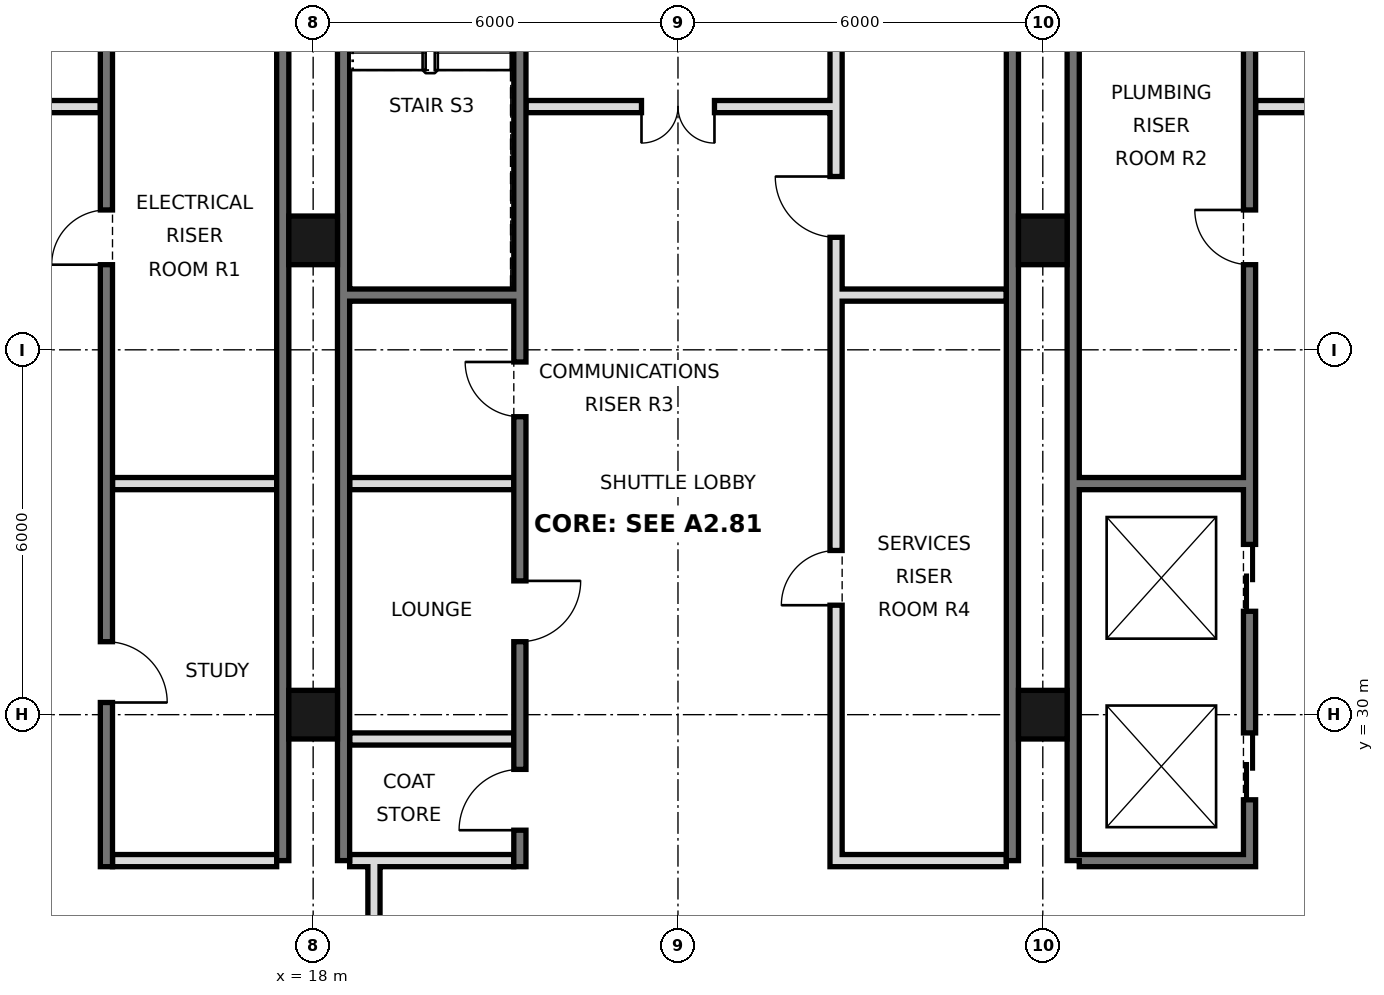
"""IFC4 building model, lengths in metres.
Left out: names, types, materials, properties, quantities, classifications, styles, units other than length and angle.
Written with IfcOpenShell. Run it as: python <this file> out.ifc"""

import sys

from ifc_helpers import new_model, si_unit, direction, frame, frame_2d, origin, origin_2d, place, context, subcontext, project, spatial, rectangle, hollow_rectangle, extrude, element, fill, save


model = new_model("IFC4")
c1 = context("Model", 3, precision=1e-05, world=origin(), true_north=direction((0.0, 1.0)))
c2 = subcontext(c1, "Body", "Model", "MODEL_VIEW")
j1 = project(units=[si_unit("LENGTHUNIT", "METRE"), si_unit("PLANEANGLEUNIT", "RADIAN")], contexts=[c1])
p1 = place(None, origin())
s1 = spatial("IfcSite", under=j1, at=p1, CompositionType="ELEMENT")
p2 = place(p1, origin())
s2 = spatial("IfcBuilding", under=s1, at=p2, CompositionType="ELEMENT")
p3 = place(p2, frame((0.0, 0.0, 323.2)))
s3 = spatial("IfcBuildingStorey", under=s2, at=p3, CompositionType="ELEMENT", Elevation=323.2)
for number, where, z_axis, x_axis in (
    (1, (18.0, 30.0, 0.0), (0.0, 0.0, 1.0), (1.0, 0.0, 0.0)),
    (2, (18.0, 37.8, 0.0), (0.0, 0.0, 1.0), (1.0, 0.0, 0.0)),
    (3, (30.0, 30.0, 0.0), (0.0, 0.0, 1.0), (1.0, 0.0, 0.0)),
    (4, (30.0, 37.8, 0.0), (0.0, 0.0, 1.0), (1.0, 0.0, 0.0)),
):
    element("IfcColumn", number, at=place(p3, frame(where, z_axis=z_axis, x_axis=x_axis)), inside=s3, PredefinedType="COLUMN", context=c2, shape_type="SweptSolid", body=[
        extrude(hollow_rectangle(XDim=0.8, YDim=0.8, WallThickness=0.025, at=origin_2d()), origin(), (0.0, 0.0, 1.0), 3.6),
    ])
for number, where, z_axis, x_axis in (
    (5, (17.5, 27.6, 0.0), (0.0, 0.0, 1.0), (0.0, 1.0, 0.0)),
    (6, (18.5, 27.6, 0.0), (0.0, 0.0, 1.0), (0.0, 1.0, 0.0)),
    (7, (29.5, 27.6, 0.0), (0.0, 0.0, 1.0), (0.0, 1.0, 0.0)),
    (8, (30.5, 27.6, 0.0), (0.0, 0.0, 1.0), (0.0, 1.0, 0.0)),
):
    element("IfcWall", number, at=place(p3, frame(where, z_axis=z_axis, x_axis=x_axis)), inside=s3, PredefinedType="SOLIDWALL", context=c2, shape_type="SweptSolid", body=[
        extrude(rectangle(XDim=17.5, YDim=0.2, at=frame_2d((8.75, 0.0))), origin(), (0.0, 0.0, 1.0), 3.42),
    ])
p4 = place(p3, frame((19.0, 21.6, 0.0), z_axis=(0.0, 0.0, 1.0), x_axis=(0.0, 1.0, 0.0)))
e9 = element("IfcWall", 9, at=p4, inside=s3, PredefinedType="PARTITIONING", context=c2, shape_type="SweptSolid", body=[
    extrude(rectangle(XDim=6.0, YDim=0.2, at=frame_2d((3.0, 0.0))), origin(), (0.0, 0.0, 1.0), 3.42),
])
p5 = place(p4, frame((2.1, 0.0, 0.0)))
e10 = element("IfcOpeningElement", 10, at=p5, cuts=e9, PredefinedType="OPENING", context=c2, shape_type="SweptSolid", body=[
    extrude(rectangle(XDim=1.8, YDim=2.1, at=frame_2d((0.9, 1.05))), frame((0.0, 0.11, 0.0), z_axis=(0.0, -1.0, 0.0), x_axis=(1.0, 0.0, 0.0)), (0.0, 0.0, 1.0), 0.22),
])
p6 = place(p3, frame((14.6, 27.5, 0.0), z_axis=(0.0, 0.0, 1.0), x_axis=(0.0, 1.0, 0.0)))
e11 = element("IfcWall", 11, at=p6, inside=s3, PredefinedType="SOLIDWALL", context=c2, shape_type="SweptSolid", body=[
    extrude(rectangle(XDim=17.5, YDim=0.2, at=frame_2d((8.75, 0.0))), origin(), (0.0, 0.0, 1.0), 3.42),
])
p7 = place(p6, frame((15.4, 0.0, 0.0)))
e12 = element("IfcOpeningElement", 12, at=p7, cuts=e11, PredefinedType="OPENING", context=c2, shape_type="SweptSolid", body=[
    extrude(rectangle(XDim=1.1, YDim=2.1, at=frame_2d((0.55, 1.05))), frame((0.0, 0.11, 0.0), z_axis=(0.0, -1.0, 0.0), x_axis=(1.0, 0.0, 0.0)), (0.0, 0.0, 1.0), 0.22),
])
p8 = place(p6, frame((2.7, 0.0, 0.0)))
e13 = element("IfcOpeningElement", 13, at=p8, cuts=e11, PredefinedType="OPENING", context=c2, shape_type="SweptSolid", body=[
    extrude(rectangle(XDim=1.0, YDim=2.1, at=frame_2d((0.5, 1.05))), frame((0.0, 0.11, 0.0), z_axis=(0.0, -1.0, 0.0), x_axis=(1.0, 0.0, 0.0)), (0.0, 0.0, 1.0), 0.22),
])
p9 = place(p6, frame((9.9, 0.0, 0.0)))
e14 = element("IfcOpeningElement", 14, at=p9, cuts=e11, PredefinedType="OPENING", context=c2, shape_type="SweptSolid", body=[
    extrude(rectangle(XDim=0.9, YDim=2.1, at=frame_2d((0.45, 1.05))), frame((0.0, 0.11, 0.0), z_axis=(0.0, -1.0, 0.0), x_axis=(1.0, 0.0, 0.0)), (0.0, 0.0, 1.0), 0.22),
])
p10 = place(p3, frame((21.4, 27.5, 0.0), z_axis=(0.0, 0.0, 1.0), x_axis=(0.0, 1.0, 0.0)))
e15 = element("IfcWall", 15, at=p10, inside=s3, PredefinedType="SOLIDWALL", context=c2, shape_type="SweptSolid", body=[
    extrude(rectangle(XDim=17.5, YDim=0.2, at=frame_2d((8.75, 0.0))), origin(), (0.0, 0.0, 1.0), 3.42),
])
p11 = place(p10, frame((0.6, 0.0, 0.0)))
e16 = element("IfcOpeningElement", 16, at=p11, cuts=e15, PredefinedType="OPENING", context=c2, shape_type="SweptSolid", body=[
    extrude(rectangle(XDim=1.0, YDim=2.1, at=frame_2d((0.5, 1.05))), frame((0.0, 0.11, 0.0), z_axis=(0.0, -1.0, 0.0), x_axis=(1.0, 0.0, 0.0)), (0.0, 0.0, 1.0), 0.22),
])
p12 = place(p10, frame((3.7, 0.0, 0.0)))
e17 = element("IfcOpeningElement", 17, at=p12, cuts=e15, PredefinedType="OPENING", context=c2, shape_type="SweptSolid", body=[
    extrude(rectangle(XDim=1.0, YDim=2.1, at=frame_2d((0.5, 1.05))), frame((0.0, 0.11, 0.0), z_axis=(0.0, -1.0, 0.0), x_axis=(1.0, 0.0, 0.0)), (0.0, 0.0, 1.0), 0.22),
])
p13 = place(p10, frame((16.2, 0.0, 0.0)))
e18 = element("IfcOpeningElement", 18, at=p13, cuts=e15, PredefinedType="OPENING", context=c2, shape_type="SweptSolid", body=[
    extrude(rectangle(XDim=1.0, YDim=2.1, at=frame_2d((0.5, 1.05))), frame((0.0, 0.11, 0.0), z_axis=(0.0, -1.0, 0.0), x_axis=(1.0, 0.0, 0.0)), (0.0, 0.0, 1.0), 0.22),
])
p14 = place(p10, frame((7.4, 0.0, 0.0)))
e19 = element("IfcOpeningElement", 19, at=p14, cuts=e15, PredefinedType="OPENING", context=c2, shape_type="SweptSolid", body=[
    extrude(rectangle(XDim=0.9, YDim=2.1, at=frame_2d((0.45, 1.05))), frame((0.0, 0.11, 0.0), z_axis=(0.0, -1.0, 0.0), x_axis=(1.0, 0.0, 0.0)), (0.0, 0.0, 1.0), 0.22),
])
p15 = place(p3, frame((26.6, 27.5, 0.0), z_axis=(0.0, 0.0, 1.0), x_axis=(0.0, 1.0, 0.0)))
e20 = element("IfcWall", 20, at=p15, inside=s3, PredefinedType="SOLIDWALL", context=c2, shape_type="SweptSolid", body=[
    extrude(rectangle(XDim=17.5, YDim=0.2, at=frame_2d((8.75, 0.0))), origin(), (0.0, 0.0, 1.0), 3.42),
])
p16 = place(p15, frame((4.3, 0.0, 0.0)))
e21 = element("IfcOpeningElement", 21, at=p16, cuts=e20, PredefinedType="OPENING", context=c2, shape_type="SweptSolid", body=[
    extrude(rectangle(XDim=0.9, YDim=2.1, at=frame_2d((0.45, 1.05))), frame((0.0, 0.11, 0.0), z_axis=(0.0, -1.0, 0.0), x_axis=(1.0, 0.0, 0.0)), (0.0, 0.0, 1.0), 0.22),
])
p17 = place(p15, frame((10.35, 0.0, 0.0)))
e22 = element("IfcOpeningElement", 22, at=p17, cuts=e20, PredefinedType="OPENING", context=c2, shape_type="SweptSolid", body=[
    extrude(rectangle(XDim=1.0, YDim=2.1, at=frame_2d((0.5, 1.05))), frame((0.0, 0.11, 0.0), z_axis=(0.0, -1.0, 0.0), x_axis=(1.0, 0.0, 0.0)), (0.0, 0.0, 1.0), 0.22),
])
p18 = place(p3, frame((33.4, 27.5, 0.0), z_axis=(0.0, 0.0, 1.0), x_axis=(0.0, 1.0, 0.0)))
e23 = element("IfcWall", 23, at=p18, inside=s3, PredefinedType="SOLIDWALL", context=c2, shape_type="SweptSolid", body=[
    extrude(rectangle(XDim=17.5, YDim=0.2, at=frame_2d((8.75, 0.0))), origin(), (0.0, 0.0, 1.0), 3.42),
])
p19 = place(p18, frame((1.1, 0.0, 0.0)))
e24 = element("IfcOpeningElement", 24, at=p19, cuts=e23, PredefinedType="OPENING", context=c2, shape_type="SweptSolid", body=[
    extrude(rectangle(XDim=1.1, YDim=2.1, at=frame_2d((0.55, 1.05))), frame((0.0, 0.11, 0.0), z_axis=(0.0, -1.0, 0.0), x_axis=(1.0, 0.0, 0.0)), (0.0, 0.0, 1.0), 0.22),
])
p20 = place(p18, frame((4.2, 0.0, 0.0)))
e25 = element("IfcOpeningElement", 25, at=p20, cuts=e23, PredefinedType="OPENING", context=c2, shape_type="SweptSolid", body=[
    extrude(rectangle(XDim=1.1, YDim=2.1, at=frame_2d((0.55, 1.05))), frame((0.0, 0.11, 0.0), z_axis=(0.0, -1.0, 0.0), x_axis=(1.0, 0.0, 0.0)), (0.0, 0.0, 1.0), 0.22),
])
p21 = place(p18, frame((15.4, 0.0, 0.0)))
e26 = element("IfcOpeningElement", 26, at=p21, cuts=e23, PredefinedType="OPENING", context=c2, shape_type="SweptSolid", body=[
    extrude(rectangle(XDim=1.1, YDim=2.1, at=frame_2d((0.55, 1.05))), frame((0.0, 0.11, 0.0), z_axis=(0.0, -1.0, 0.0), x_axis=(1.0, 0.0, 0.0)), (0.0, 0.0, 1.0), 0.22),
])
p22 = place(p18, frame((9.9, 0.0, 0.0)))
e27 = element("IfcOpeningElement", 27, at=p22, cuts=e23, PredefinedType="OPENING", context=c2, shape_type="SweptSolid", body=[
    extrude(rectangle(XDim=0.9, YDim=2.1, at=frame_2d((0.45, 1.05))), frame((0.0, 0.11, 0.0), z_axis=(0.0, -1.0, 0.0), x_axis=(1.0, 0.0, 0.0)), (0.0, 0.0, 1.0), 0.22),
])
for number, where, z_axis, x_axis in (
    (28, (14.7, 27.6, 0.0), (0.0, 0.0, 1.0), (1.0, 0.0, 0.0)),
    (29, (18.6, 27.6, 0.0), (0.0, 0.0, 1.0), (1.0, 0.0, 0.0)),
):
    element("IfcWall", number, at=place(p3, frame(where, z_axis=z_axis, x_axis=x_axis)), inside=s3, PredefinedType="PARTITIONING", context=c2, shape_type="SweptSolid", body=[
        extrude(rectangle(XDim=2.7, YDim=0.2, at=frame_2d((1.35, 0.0))), origin(), (0.0, 0.0, 1.0), 3.42),
    ])
for number, where, z_axis, x_axis in (
    (30, (26.7, 27.6, 0.0), (0.0, 0.0, 1.0), (1.0, 0.0, 0.0)),
    (31, (30.6, 27.6, 0.0), (0.0, 0.0, 1.0), (1.0, 0.0, 0.0)),
):
    element("IfcWall", number, at=place(p3, frame(where, z_axis=z_axis, x_axis=x_axis)), inside=s3, PredefinedType="SOLIDWALL", context=c2, shape_type="SweptSolid", body=[
        extrude(rectangle(XDim=2.7, YDim=0.2, at=frame_2d((1.35, 0.0))), origin(), (0.0, 0.0, 1.0), 3.42),
    ])
p23 = place(p3, frame((18.6, 29.6, 0.0), z_axis=(0.0, 0.0, 1.0), x_axis=(1.0, 0.0, 0.0)))
e32 = element("IfcWall", 32, at=p23, inside=s3, PredefinedType="PARTITIONING", context=c2, shape_type="SweptSolid", body=[
    extrude(rectangle(XDim=2.7, YDim=0.2, at=frame_2d((1.35, 0.0))), origin(), (0.0, 0.0, 1.0), 3.42),
])
for number, where, z_axis, x_axis in (
    (33, (14.7, 33.8, 0.0), (0.0, 0.0, 1.0), (1.0, 0.0, 0.0)),
    (34, (18.6, 33.8, 0.0), (0.0, 0.0, 1.0), (1.0, 0.0, 0.0)),
    (35, (30.6, 33.8, 0.0), (0.0, 0.0, 1.0), (1.0, 0.0, 0.0)),
    (36, (18.6, 36.9, 0.0), (0.0, 0.0, 1.0), (1.0, 0.0, 0.0)),
    (37, (26.7, 36.9, 0.0), (0.0, 0.0, 1.0), (1.0, 0.0, 0.0)),
):
    element("IfcWall", number, at=place(p3, frame(where, z_axis=z_axis, x_axis=x_axis)), inside=s3, PredefinedType="SOLIDWALL", context=c2, shape_type="SweptSolid", body=[
        extrude(rectangle(XDim=2.7, YDim=0.2, at=frame_2d((1.35, 0.0))), origin(), (0.0, 0.0, 1.0), 3.42),
    ])
p24 = place(p3, frame((21.5, 40.0, 0.0), z_axis=(0.0, 0.0, 1.0), x_axis=(1.0, 0.0, 0.0)))
e38 = element("IfcWall", 38, at=p24, inside=s3, PredefinedType="PARTITIONING", context=c2, shape_type="SweptSolid", body=[
    extrude(rectangle(XDim=5.0, YDim=0.2, at=frame_2d((2.5, 0.0))), origin(), (0.0, 0.0, 1.0), 3.42),
])
p25 = place(p24, frame((1.9, 0.0, 0.0)))
e39 = element("IfcOpeningElement", 39, at=p25, cuts=e38, PredefinedType="OPENING", context=c2, shape_type="SweptSolid", body=[
    extrude(rectangle(XDim=1.2, YDim=2.1, at=frame_2d((0.6, 1.05))), frame((0.0, 0.11, 0.0), z_axis=(0.0, -1.0, 0.0), x_axis=(1.0, 0.0, 0.0)), (0.0, 0.0, 1.0), 0.22),
])
p26 = place(p3, frame((33.5, 40.0, 0.0), z_axis=(0.0, 0.0, 1.0), x_axis=(1.0, 0.0, 0.0)))
e40 = element("IfcWall", 40, at=p26, inside=s3, PredefinedType="PARTITIONING", context=c2, shape_type="SweptSolid", body=[
    extrude(rectangle(XDim=5.0, YDim=0.2, at=frame_2d((2.5, 0.0))), origin(), (0.0, 0.0, 1.0), 3.42),
])
p27 = place(p26, frame((1.9, 0.0, 0.0)))
e41 = element("IfcOpeningElement", 41, at=p27, cuts=e40, PredefinedType="OPENING", context=c2, shape_type="SweptSolid", body=[
    extrude(rectangle(XDim=1.2, YDim=2.1, at=frame_2d((0.6, 1.05))), frame((0.0, 0.11, 0.0), z_axis=(0.0, -1.0, 0.0), x_axis=(1.0, 0.0, 0.0)), (0.0, 0.0, 1.0), 0.22),
])
p28 = place(p3, frame((9.5, 40.0, 0.0), z_axis=(0.0, 0.0, 1.0), x_axis=(1.0, 0.0, 0.0)))
e42 = element("IfcWall", 42, at=p28, inside=s3, PredefinedType="PARTITIONING", context=c2, shape_type="SweptSolid", body=[
    extrude(rectangle(XDim=5.0, YDim=0.2, at=frame_2d((2.5, 0.0))), origin(), (0.0, 0.0, 1.0), 3.42),
])
p29 = place(p28, frame((1.9, 0.0, 0.0)))
e43 = element("IfcOpeningElement", 43, at=p29, cuts=e42, PredefinedType="OPENING", context=c2, shape_type="SweptSolid", body=[
    extrude(rectangle(XDim=1.2, YDim=2.1, at=frame_2d((0.6, 1.05))), frame((0.0, 0.11, 0.0), z_axis=(0.0, -1.0, 0.0), x_axis=(1.0, 0.0, 0.0)), (0.0, 0.0, 1.0), 0.22),
])
p30 = place(p25, frame((1.2, 0.0, 0.0), z_axis=(0.0, 0.0, 1.0), x_axis=(-1.0, 0.0, 0.0)))
e44 = element("IfcDoor", 44, at=p30, inside=s3, OperationType="DOUBLE_DOOR_SINGLE_SWING", PredefinedType="DOOR", context=c2, shape_type="SweptSolid", body=[
    extrude(rectangle(XDim=1.2, YDim=2.1, at=frame_2d((0.6, 1.05))), frame((0.0, 0.025, 0.0), z_axis=(0.0, -1.0, 0.0), x_axis=(1.0, 0.0, 0.0)), (0.0, 0.0, 1.0), 0.05),
])
fill(e39, e44)
p31 = place(p19, origin())
e45 = element("IfcDoor", 45, at=p31, inside=s3, OperationType="DOUBLE_DOOR_SLIDING", PredefinedType="DOOR", context=c2, shape_type="SweptSolid", body=[
    extrude(rectangle(XDim=1.1, YDim=2.1, at=frame_2d((0.55, 1.05))), frame((0.0, 0.025, 0.0), z_axis=(0.0, -1.0, 0.0), x_axis=(1.0, 0.0, 0.0)), (0.0, 0.0, 1.0), 0.05),
])
fill(e24, e45)
p32 = place(p20, origin())
e46 = element("IfcDoor", 46, at=p32, inside=s3, OperationType="DOUBLE_DOOR_SLIDING", PredefinedType="DOOR", context=c2, shape_type="SweptSolid", body=[
    extrude(rectangle(XDim=1.1, YDim=2.1, at=frame_2d((0.55, 1.05))), frame((0.0, 0.025, 0.0), z_axis=(0.0, -1.0, 0.0), x_axis=(1.0, 0.0, 0.0)), (0.0, 0.0, 1.0), 0.05),
])
fill(e25, e46)
p33 = place(p11, origin())
e47 = element("IfcDoor", 47, at=p33, inside=s3, OperationType="SINGLE_SWING_LEFT", PredefinedType="DOOR", context=c2, shape_type="SweptSolid", body=[
    extrude(rectangle(XDim=1.0, YDim=2.1, at=frame_2d((0.5, 1.05))), frame((0.0, 0.025, 0.0), z_axis=(0.0, -1.0, 0.0), x_axis=(1.0, 0.0, 0.0)), (0.0, 0.0, 1.0), 0.05),
])
fill(e16, e47)
p34 = place(p12, origin())
e48 = element("IfcDoor", 48, at=p34, inside=s3, OperationType="SINGLE_SWING_RIGHT", PredefinedType="DOOR", context=c2, shape_type="SweptSolid", body=[
    extrude(rectangle(XDim=1.0, YDim=2.1, at=frame_2d((0.5, 1.05))), frame((0.0, 0.025, 0.0), z_axis=(0.0, -1.0, 0.0), x_axis=(1.0, 0.0, 0.0)), (0.0, 0.0, 1.0), 0.05),
])
fill(e17, e48)
p35 = place(p8, frame((1.0, 0.0, 0.0), z_axis=(0.0, 0.0, 1.0), x_axis=(-1.0, 0.0, 0.0)))
e49 = element("IfcDoor", 49, at=p35, inside=s3, OperationType="SINGLE_SWING_RIGHT", PredefinedType="DOOR", context=c2, shape_type="SweptSolid", body=[
    extrude(rectangle(XDim=1.0, YDim=2.1, at=frame_2d((0.5, 1.05))), frame((0.0, 0.025, 0.0), z_axis=(0.0, -1.0, 0.0), x_axis=(1.0, 0.0, 0.0)), (0.0, 0.0, 1.0), 0.05),
])
fill(e13, e49)
p36 = place(p9, origin())
e50 = element("IfcDoor", 50, at=p36, inside=s3, OperationType="SINGLE_SWING_LEFT", PredefinedType="DOOR", context=c2, shape_type="SweptSolid", body=[
    extrude(rectangle(XDim=0.9, YDim=2.1, at=frame_2d((0.45, 1.05))), frame((0.0, 0.025, 0.0), z_axis=(0.0, -1.0, 0.0), x_axis=(1.0, 0.0, 0.0)), (0.0, 0.0, 1.0), 0.05),
])
fill(e14, e50)
p37 = place(p22, frame((0.9, 0.0, 0.0), z_axis=(0.0, 0.0, 1.0), x_axis=(-1.0, 0.0, 0.0)))
e51 = element("IfcDoor", 51, at=p37, inside=s3, OperationType="SINGLE_SWING_LEFT", PredefinedType="DOOR", context=c2, shape_type="SweptSolid", body=[
    extrude(rectangle(XDim=0.9, YDim=2.1, at=frame_2d((0.45, 1.05))), frame((0.0, 0.025, 0.0), z_axis=(0.0, -1.0, 0.0), x_axis=(1.0, 0.0, 0.0)), (0.0, 0.0, 1.0), 0.05),
])
fill(e27, e51)
p38 = place(p14, frame((0.9, 0.0, 0.0), z_axis=(0.0, 0.0, 1.0), x_axis=(-1.0, 0.0, 0.0)))
e52 = element("IfcDoor", 52, at=p38, inside=s3, OperationType="SINGLE_SWING_LEFT", PredefinedType="DOOR", context=c2, shape_type="SweptSolid", body=[
    extrude(rectangle(XDim=0.9, YDim=2.1, at=frame_2d((0.45, 1.05))), frame((0.0, 0.025, 0.0), z_axis=(0.0, -1.0, 0.0), x_axis=(1.0, 0.0, 0.0)), (0.0, 0.0, 1.0), 0.05),
])
fill(e19, e52)
p39 = place(p16, origin())
e53 = element("IfcDoor", 53, at=p39, inside=s3, OperationType="SINGLE_SWING_LEFT", PredefinedType="DOOR", context=c2, shape_type="SweptSolid", body=[
    extrude(rectangle(XDim=0.9, YDim=2.1, at=frame_2d((0.45, 1.05))), frame((0.0, 0.025, 0.0), z_axis=(0.0, -1.0, 0.0), x_axis=(1.0, 0.0, 0.0)), (0.0, 0.0, 1.0), 0.05),
])
fill(e21, e53)
p40 = place(p17, frame((1.0, 0.0, 0.0), z_axis=(0.0, 0.0, 1.0), x_axis=(-1.0, 0.0, 0.0)))
e54 = element("IfcDoor", 54, at=p40, inside=s3, OperationType="SINGLE_SWING_LEFT", PredefinedType="DOOR", context=c2, shape_type="SweptSolid", body=[
    extrude(rectangle(XDim=1.0, YDim=2.1, at=frame_2d((0.5, 1.05))), frame((0.0, 0.025, 0.0), z_axis=(0.0, -1.0, 0.0), x_axis=(1.0, 0.0, 0.0)), (0.0, 0.0, 1.0), 0.05),
])
fill(e22, e54)
save(model, sys.argv[1])
